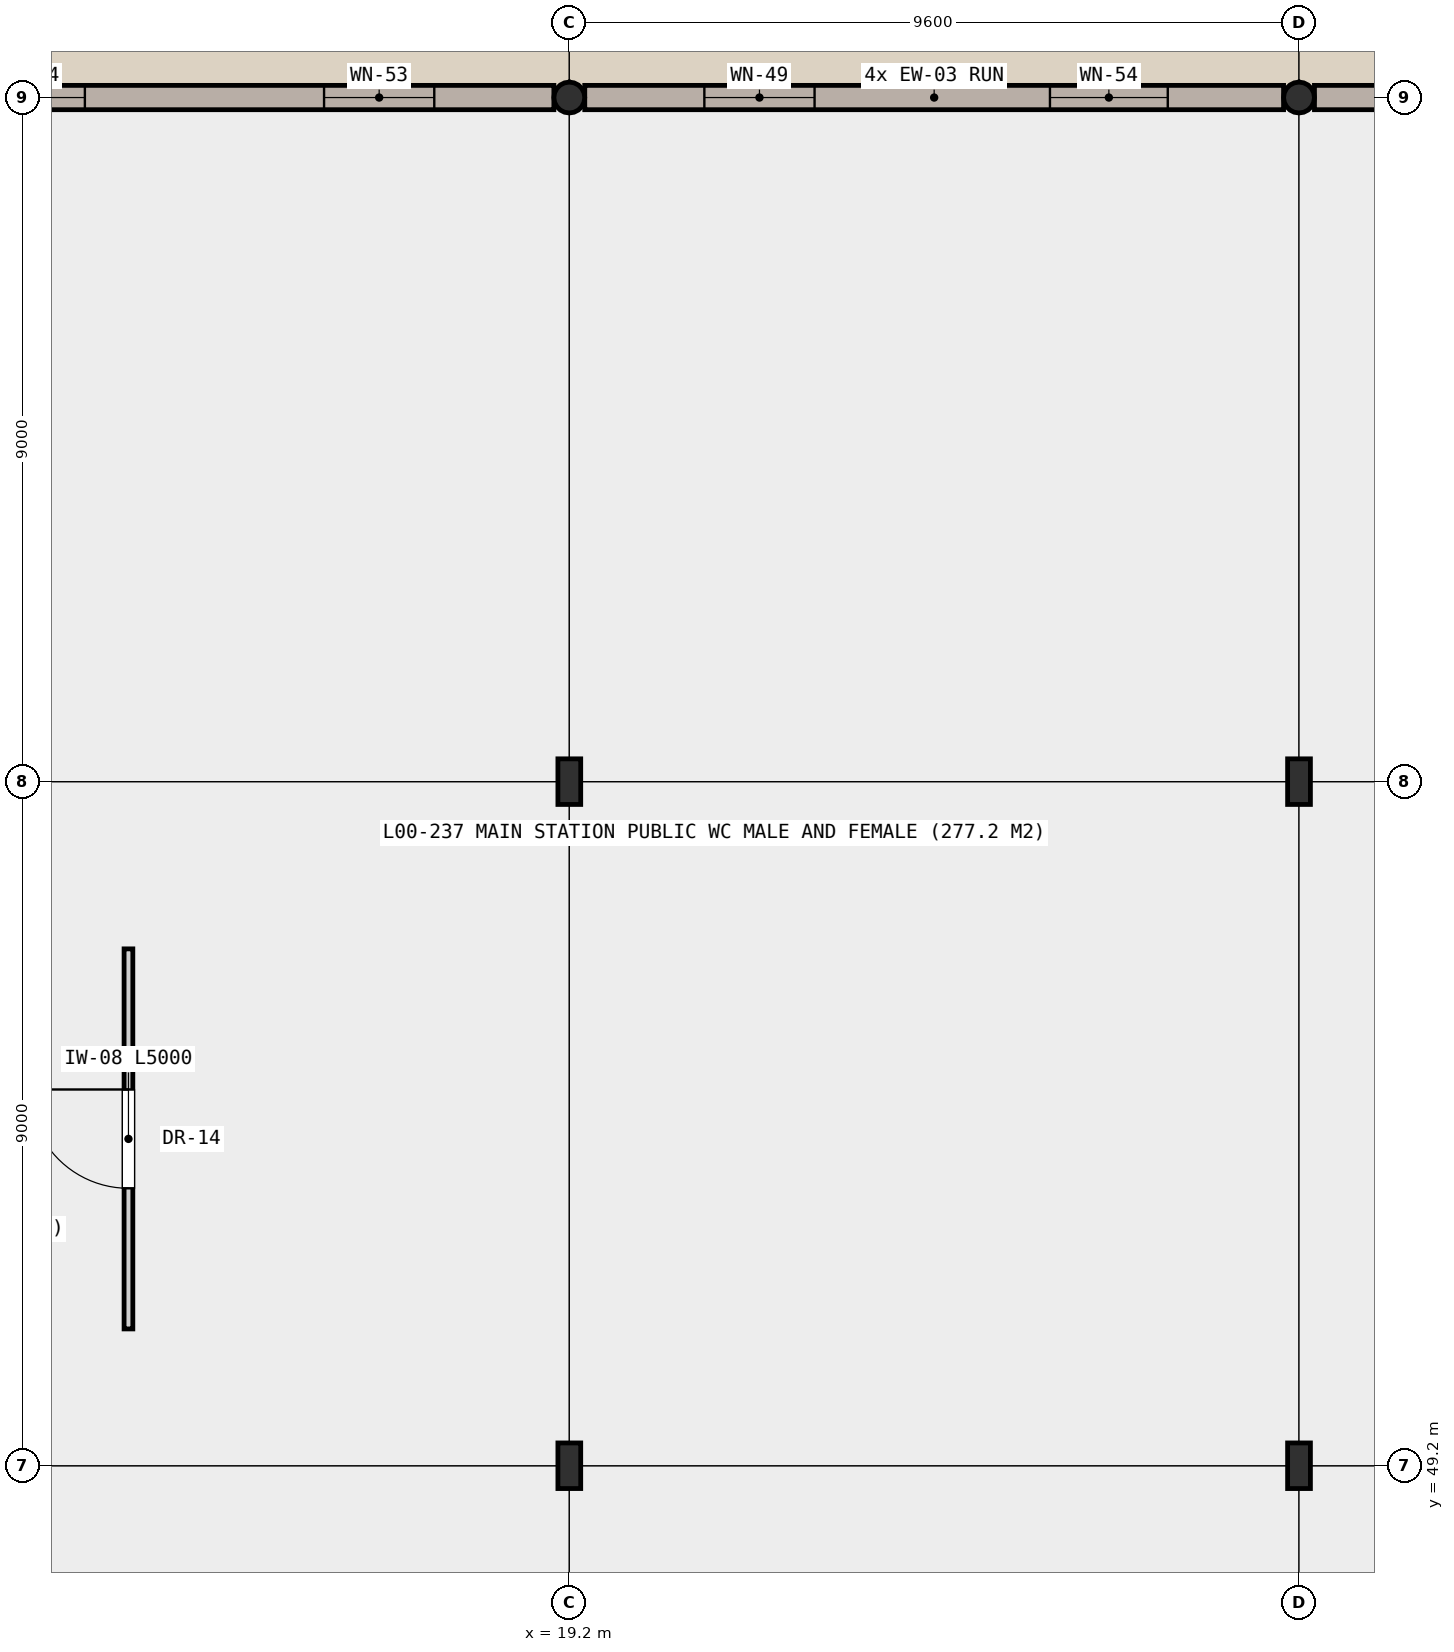
"""IFC4 building model, lengths in metres.
Left out: names, types, materials, properties, quantities, classifications, styles, units other than length and angle.
Written with IfcOpenShell. Run it as: python <this file> out.ifc"""

import sys

from ifc_helpers import new_model, si_unit, direction, frame, frame_2d, origin, origin_2d, place, context, subcontext, project, spatial, rectangle, hollow_circle, i_section, extrude, element, fill, save


model = new_model("IFC4")
c1 = context("Model", 3, precision=1e-05, world=origin(), true_north=direction((0.0, 1.0)))
c2 = subcontext(c1, "Body", "Model", "MODEL_VIEW")
j1 = project(units=[si_unit("LENGTHUNIT", "METRE"), si_unit("PLANEANGLEUNIT", "RADIAN")], contexts=[c1])
p1 = place(None, origin())
s1 = spatial("IfcSite", under=j1, at=p1, CompositionType="ELEMENT")
p2 = place(p1, origin())
s2 = spatial("IfcBuilding", under=s1, at=p2, CompositionType="ELEMENT")
p3 = place(p2, origin())
s3 = spatial("IfcBuildingStorey", under=s2, at=p3, CompositionType="ELEMENT", Elevation=0.0)
for number, where, z_axis, x_axis in (
    (1, (19.2, 49.2, 0.0), (0.0, 0.0, 1.0), (1.0, 0.0, 0.0)),
    (2, (19.2, 58.2, 0.0), (0.0, 0.0, 1.0), (1.0, 0.0, 0.0)),
):
    element("IfcColumn", number, at=place(p3, frame(where, z_axis=z_axis, x_axis=x_axis)), inside=s3, PredefinedType="COLUMN", context=c2, shape_type="SweptSolid", body=[
        extrude(i_section(OverallWidth=0.3, OverallDepth=0.6, WebThickness=0.015, FlangeThickness=0.03, FilletRadius=0.027, at=origin_2d()), origin(), (0.0, 0.0, 1.0), 5.4),
    ])
p4 = place(p3, frame((19.2, 67.2, 0.0), z_axis=(0.0, 0.0, 1.0), x_axis=(1.0, 0.0, 0.0)))
e3 = element("IfcColumn", 3, at=p4, inside=s3, PredefinedType="COLUMN", context=c2, shape_type="SweptSolid", body=[
    extrude(hollow_circle(Radius=0.203, WallThickness=0.02, at=origin_2d()), origin(), (0.0, 0.0, 1.0), 5.4),
])
for number, where, z_axis, x_axis in (
    (4, (28.8, 49.2, 0.0), (0.0, 0.0, 1.0), (1.0, 0.0, 0.0)),
    (5, (28.8, 58.2, 0.0), (0.0, 0.0, 1.0), (1.0, 0.0, 0.0)),
):
    element("IfcColumn", number, at=place(p3, frame(where, z_axis=z_axis, x_axis=x_axis)), inside=s3, PredefinedType="COLUMN", context=c2, shape_type="SweptSolid", body=[
        extrude(i_section(OverallWidth=0.3, OverallDepth=0.6, WebThickness=0.015, FlangeThickness=0.03, FilletRadius=0.027, at=origin_2d()), origin(), (0.0, 0.0, 1.0), 5.4),
    ])
p5 = place(p3, frame((28.8, 67.2, 0.0), z_axis=(0.0, 0.0, 1.0), x_axis=(1.0, 0.0, 0.0)))
e6 = element("IfcColumn", 6, at=p5, inside=s3, PredefinedType="COLUMN", context=c2, shape_type="SweptSolid", body=[
    extrude(hollow_circle(Radius=0.203, WallThickness=0.02, at=origin_2d()), origin(), (0.0, 0.0, 1.0), 5.4),
])
p6 = place(p3, frame((9.803, 67.2, 0.0), z_axis=(0.0, 0.0, 1.0), x_axis=(1.0, 0.0, 0.0)))
e7 = element("IfcWall", 7, at=p6, inside=s3, PredefinedType="SOLIDWALL", context=c2, shape_type="SweptSolid", body=[
    extrude(rectangle(XDim=9.194, YDim=0.32, at=frame_2d((4.597, 0.0))), origin(), (0.0, 0.0, 1.0), 4.49),
])
p7 = place(p6, frame((1.573, 0.0, 0.85)))
e8 = element("IfcOpeningElement", 8, at=p7, cuts=e7, PredefinedType="OPENING", context=c2, shape_type="SweptSolid", body=[
    extrude(rectangle(XDim=1.45, YDim=1.5, at=frame_2d((0.725, 0.75))), frame((0.0, 0.17, 0.0), z_axis=(0.0, -1.0, 0.0), x_axis=(1.0, 0.0, 0.0)), (0.0, 0.0, 1.0), 0.34),
])
p8 = place(p6, frame((6.17, 0.0, 0.85)))
e9 = element("IfcOpeningElement", 9, at=p8, cuts=e7, PredefinedType="OPENING", context=c2, shape_type="SweptSolid", body=[
    extrude(rectangle(XDim=1.45, YDim=1.85, at=frame_2d((0.725, 0.925))), frame((0.0, 0.17, 0.0), z_axis=(0.0, -1.0, 0.0), x_axis=(1.0, 0.0, 0.0)), (0.0, 0.0, 1.0), 0.34),
])
p9 = place(p3, frame((19.403, 67.2, 0.0), z_axis=(0.0, 0.0, 1.0), x_axis=(1.0, 0.0, 0.0)))
e10 = element("IfcWall", 10, at=p9, inside=s3, PredefinedType="SOLIDWALL", context=c2, shape_type="SweptSolid", body=[
    extrude(rectangle(XDim=9.193, YDim=0.32, at=frame_2d((4.597, 0.0))), origin(), (0.0, 0.0, 1.0), 4.49),
])
p10 = place(p9, frame((1.573, 0.0, 0.85)))
e11 = element("IfcOpeningElement", 11, at=p10, cuts=e10, PredefinedType="OPENING", context=c2, shape_type="SweptSolid", body=[
    extrude(rectangle(XDim=1.45, YDim=2.15, at=frame_2d((0.725, 1.075))), frame((0.0, 0.17, 0.0), z_axis=(0.0, -1.0, 0.0), x_axis=(1.0, 0.0, 0.0)), (0.0, 0.0, 1.0), 0.34),
])
p11 = place(p9, frame((6.12, 0.0, 0.85)))
e12 = element("IfcOpeningElement", 12, at=p11, cuts=e10, PredefinedType="OPENING", context=c2, shape_type="SweptSolid", body=[
    extrude(rectangle(XDim=1.55, YDim=1.5, at=frame_2d((0.775, 0.75))), frame((0.0, 0.17, 0.0), z_axis=(0.0, -1.0, 0.0), x_axis=(1.0, 0.0, 0.0)), (0.0, 0.0, 1.0), 0.34),
])
p12 = place(p3, frame((29.003, 67.2, 0.0), z_axis=(0.0, 0.0, 1.0), x_axis=(1.0, 0.0, 0.0)))
e13 = element("IfcWall", 13, at=p12, inside=s3, PredefinedType="SOLIDWALL", context=c2, shape_type="SweptSolid", body=[
    extrude(rectangle(XDim=9.194, YDim=0.32, at=frame_2d((4.597, 0.0))), origin(), (0.0, 0.0, 1.0), 4.49),
])
p13 = place(p12, frame((1.523, 0.0, 0.85)))
e14 = element("IfcOpeningElement", 14, at=p13, cuts=e13, PredefinedType="OPENING", context=c2, shape_type="SweptSolid", body=[
    extrude(rectangle(XDim=1.55, YDim=1.85, at=frame_2d((0.775, 0.925))), frame((0.0, 0.17, 0.0), z_axis=(0.0, -1.0, 0.0), x_axis=(1.0, 0.0, 0.0)), (0.0, 0.0, 1.0), 0.34),
])
p14 = place(p12, frame((6.12, 0.0, 0.85)))
e15 = element("IfcOpeningElement", 15, at=p14, cuts=e13, PredefinedType="OPENING", context=c2, shape_type="SweptSolid", body=[
    extrude(rectangle(XDim=1.55, YDim=2.15, at=frame_2d((0.775, 1.075))), frame((0.0, 0.17, 0.0), z_axis=(0.0, -1.0, 0.0), x_axis=(1.0, 0.0, 0.0)), (0.0, 0.0, 1.0), 0.34),
])
p15 = place(p3, frame((13.4, 51.0, 0.0), z_axis=(0.0, 0.0, 1.0), x_axis=(0.0, 1.0, 0.0)))
e16 = element("IfcWall", 16, at=p15, inside=s3, PredefinedType="PARTITIONING", context=c2, shape_type="SweptSolid", body=[
    extrude(rectangle(XDim=5.0, YDim=0.115, at=frame_2d((2.5, 0.0))), origin(), (0.0, 0.0, 1.0), 5.12),
])
p16 = place(p15, frame((1.85, 0.0, 0.0)))
e17 = element("IfcOpeningElement", 17, at=p16, cuts=e16, PredefinedType="OPENING", context=c2, shape_type="SweptSolid", body=[
    extrude(rectangle(XDim=1.3, YDim=2.16, at=frame_2d((0.65, 1.08))), frame((0.0, 0.067, 0.0), z_axis=(0.0, -1.0, 0.0), x_axis=(1.0, 0.0, 0.0)), (0.0, 0.0, 1.0), 0.135),
])
p17 = place(p7, origin())
e18 = element("IfcWindow", 18, at=p17, inside=s3, PartitioningType="SINGLE_PANEL", PredefinedType="WINDOW", context=c2, shape_type="SweptSolid", body=[
    extrude(rectangle(XDim=1.45, YDim=1.5, at=frame_2d((0.725, 0.75))), frame((0.0, 0.03, 0.0), z_axis=(0.0, -1.0, 0.0), x_axis=(1.0, 0.0, 0.0)), (0.0, 0.0, 1.0), 0.06),
])
fill(e8, e18)
p18 = place(p8, origin())
e19 = element("IfcWindow", 19, at=p18, inside=s3, PartitioningType="SINGLE_PANEL", PredefinedType="WINDOW", context=c2, shape_type="SweptSolid", body=[
    extrude(rectangle(XDim=1.45, YDim=1.85, at=frame_2d((0.725, 0.925))), frame((0.0, 0.03, 0.0), z_axis=(0.0, -1.0, 0.0), x_axis=(1.0, 0.0, 0.0)), (0.0, 0.0, 1.0), 0.06),
])
fill(e9, e19)
p19 = place(p10, origin())
e20 = element("IfcWindow", 20, at=p19, inside=s3, PartitioningType="SINGLE_PANEL", PredefinedType="WINDOW", context=c2, shape_type="SweptSolid", body=[
    extrude(rectangle(XDim=1.45, YDim=2.15, at=frame_2d((0.725, 1.075))), frame((0.0, 0.03, 0.0), z_axis=(0.0, -1.0, 0.0), x_axis=(1.0, 0.0, 0.0)), (0.0, 0.0, 1.0), 0.06),
])
fill(e11, e20)
p20 = place(p11, origin())
e21 = element("IfcWindow", 21, at=p20, inside=s3, PartitioningType="SINGLE_PANEL", PredefinedType="WINDOW", context=c2, shape_type="SweptSolid", body=[
    extrude(rectangle(XDim=1.55, YDim=1.5, at=frame_2d((0.775, 0.75))), frame((0.0, 0.03, 0.0), z_axis=(0.0, -1.0, 0.0), x_axis=(1.0, 0.0, 0.0)), (0.0, 0.0, 1.0), 0.06),
])
fill(e12, e21)
p21 = place(p16, origin())
e22 = element("IfcDoor", 22, at=p21, inside=s3, OperationType="SINGLE_SWING_RIGHT", PredefinedType="DOOR", context=c2, shape_type="SweptSolid", body=[
    extrude(rectangle(XDim=1.3, YDim=2.16, at=frame_2d((0.65, 1.08))), frame((0.0, 0.025, 0.0), z_axis=(0.0, -1.0, 0.0), x_axis=(1.0, 0.0, 0.0)), (0.0, 0.0, 1.0), 0.05),
])
fill(e17, e22)
save(model, sys.argv[1])
